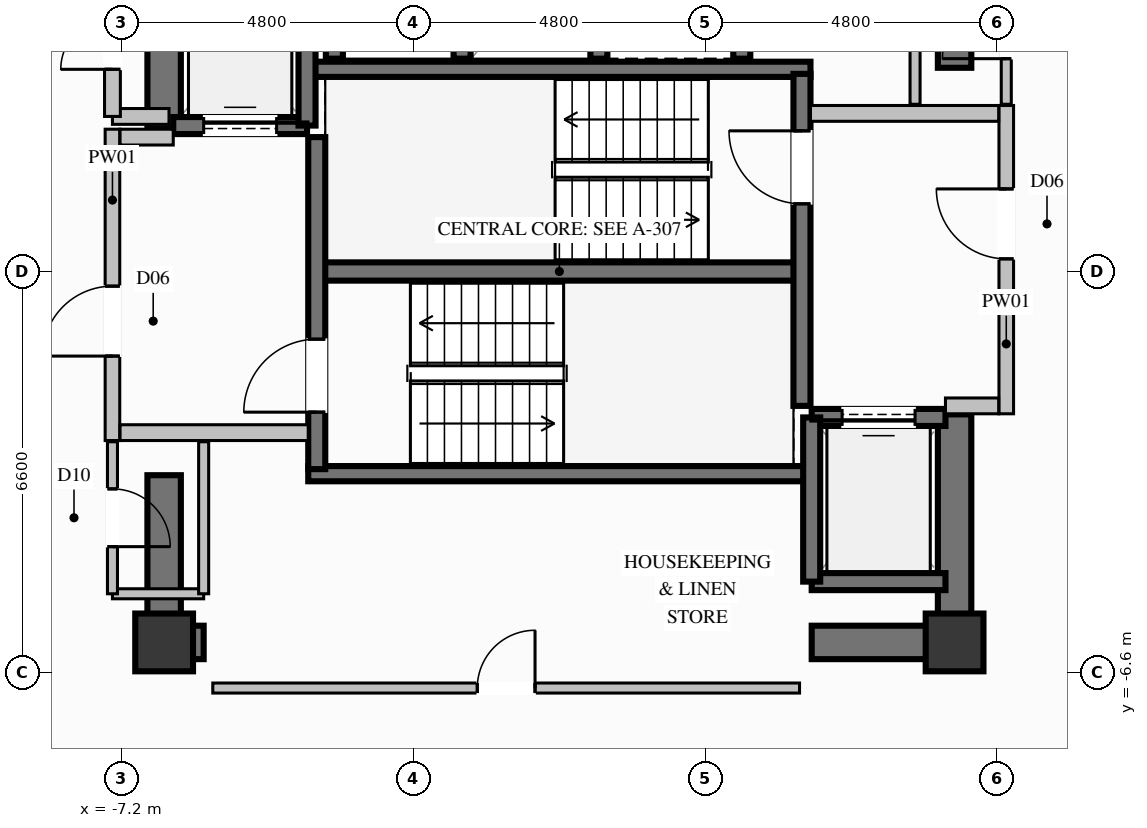
"""IFC4 building model, lengths in metres.
Left out: names, types, materials, properties, quantities, classifications, styles, units other than length and angle.
Written with IfcOpenShell. Run it as: python <this file> out.ifc"""

import sys

from ifc_helpers import new_model, si_unit, direction, frame, frame_2d, origin, origin_2d, place, context, subcontext, project, spatial, rectangle, extrude, element, fill, save


model = new_model("IFC4")
c1 = context("Model", 3, precision=1e-05, world=origin(), true_north=direction((0.0, 1.0)))
c2 = subcontext(c1, "Body", "Model", "MODEL_VIEW")
j1 = project(units=[si_unit("LENGTHUNIT", "METRE"), si_unit("PLANEANGLEUNIT", "RADIAN")], contexts=[c1])
p1 = place(None, origin())
s1 = spatial("IfcSite", under=j1, at=p1, CompositionType="ELEMENT")
p2 = place(p1, origin())
s2 = spatial("IfcBuilding", under=s1, at=p2, CompositionType="ELEMENT")
p3 = place(p2, frame((0.0, 0.0, 223.6)))
s3 = spatial("IfcBuildingStorey", under=s2, at=p3, CompositionType="ELEMENT", Elevation=223.6)
for number, where, z_axis, x_axis in (
    (1, (-6.5, -6.1, 0.0), (0.0, 0.0, 1.0), (1.0, 0.0, 0.0)),
    (2, (6.5, -6.1, 0.0), (0.0, 0.0, 1.0), (1.0, 0.0, 0.0)),
):
    element("IfcColumn", number, at=place(p3, frame(where, z_axis=z_axis, x_axis=x_axis)), inside=s3, PredefinedType="COLUMN", context=c2, shape_type="SweptSolid", body=[
        extrude(rectangle(XDim=0.95, YDim=0.95, at=origin_2d()), origin(), (0.0, 0.0, 1.0), 3.6),
    ])
p4 = place(p3, frame((-3.99, 0.0, 0.0), z_axis=(0.0, 0.0, 1.0), x_axis=(1.0, 0.0, 0.0)))
e3 = element("IfcWall", 3, at=p4, inside=s3, PredefinedType="SHEAR", context=c2, shape_type="SweptSolid", body=[
    extrude(rectangle(XDim=7.98, YDim=0.3, at=frame_2d((3.99, 0.0))), origin(), (0.0, 0.0, 1.0), 3.6),
])
for number, where, z_axis, x_axis in (
    (4, (-4.13, -3.325, 0.0), (0.0, 0.0, 1.0), (1.0, 0.0, 0.0)),
    (5, (-4.13, 3.325, 0.0), (0.0, 0.0, 1.0), (1.0, 0.0, 0.0)),
):
    element("IfcWall", number, at=place(p3, frame(where, z_axis=z_axis, x_axis=x_axis)), inside=s3, PredefinedType="SOLIDWALL", context=c2, shape_type="SweptSolid", body=[
        extrude(rectangle(XDim=8.26, YDim=0.25, at=frame_2d((4.13, 0.0))), origin(), (0.0, 0.0, 1.0), 3.6),
    ])
p5 = place(p3, frame((-6.225, -6.1, 0.0), z_axis=(0.0, 0.0, 1.0), x_axis=(1.0, 0.0, 0.0)))
e6 = element("IfcWall", 6, at=p5, inside=s3, PredefinedType="SHEAR", context=c2, shape_type="SweptSolid", body=[
    extrude(rectangle(XDim=0.375, YDim=0.55, at=frame_2d((0.188, 0.0))), origin(), (0.0, 0.0, 1.0), 3.6),
])
p6 = place(p3, frame((4.15, -6.1, 0.0), z_axis=(0.0, 0.0, 1.0), x_axis=(1.0, 0.0, 0.0)))
e7 = element("IfcWall", 7, at=p6, inside=s3, PredefinedType="SHEAR", context=c2, shape_type="SweptSolid", body=[
    extrude(rectangle(XDim=2.075, YDim=0.55, at=frame_2d((1.038, 0.0))), origin(), (0.0, 0.0, 1.0), 3.6),
])
p7 = place(p3, frame((-6.5, 2.35, 0.0), z_axis=(0.0, 0.0, 1.0), x_axis=(0.0, 1.0, 0.0)))
e8 = element("IfcWall", 8, at=p7, inside=s3, PredefinedType="SHEAR", context=c2, shape_type="SweptSolid", body=[
    extrude(rectangle(XDim=4.025, YDim=0.55, at=frame_2d((2.012, 0.0))), origin(), (0.0, 0.0, 1.0), 3.6),
])
p8 = place(p3, frame((-6.5, -6.375, 0.0), z_axis=(0.0, 0.0, 1.0), x_axis=(0.0, 1.0, 0.0)))
e9 = element("IfcWall", 9, at=p8, inside=s3, PredefinedType="SHEAR", context=c2, shape_type="SweptSolid", body=[
    extrude(rectangle(XDim=3.025, YDim=0.55, at=frame_2d((1.512, 0.0))), origin(), (0.0, 0.0, 1.0), 3.6),
])
p9 = place(p3, frame((6.5, -6.375, 0.0), z_axis=(0.0, 0.0, 1.0), x_axis=(0.0, 1.0, 0.0)))
e10 = element("IfcWall", 10, at=p9, inside=s3, PredefinedType="SHEAR", context=c2, shape_type="SweptSolid", body=[
    extrude(rectangle(XDim=4.025, YDim=0.55, at=frame_2d((2.012, 0.0))), origin(), (0.0, 0.0, 1.0), 3.6),
])
p10 = place(p3, frame((6.5, 3.35, 0.0), z_axis=(0.0, 0.0, 1.0), x_axis=(0.0, 1.0, 0.0)))
e11 = element("IfcWall", 11, at=p10, inside=s3, PredefinedType="SHEAR", context=c2, shape_type="SweptSolid", body=[
    extrude(rectangle(XDim=3.025, YDim=0.55, at=frame_2d((1.512, 0.0))), origin(), (0.0, 0.0, 1.0), 3.6),
])
for number, where, z_axis, x_axis in (
    (12, (-3.7, 6.0, 0.0), (0.0, 0.0, 1.0), (0.0, -1.0, 0.0)),
    (13, (-1.6, 3.5, 0.0), (0.0, 0.0, 1.0), (0.0, 1.0, 0.0)),
    (14, (0.65, 3.5, 0.0), (0.0, 0.0, 1.0), (0.0, 1.0, 0.0)),
    (15, (3.0, 3.5, 0.0), (0.0, 0.0, 1.0), (0.0, 1.0, 0.0)),
):
    element("IfcWall", number, at=place(p3, frame(where, z_axis=z_axis, x_axis=x_axis)), inside=s3, PredefinedType="SOLIDWALL", context=c2, shape_type="SweptSolid", body=[
        extrude(rectangle(XDim=2.5, YDim=0.28, at=frame_2d((1.25, 0.0))), origin(), (0.0, 0.0, 1.0), 3.36),
    ])
p11 = place(p3, frame((-6.35, 2.4, 0.0), z_axis=(0.0, 0.0, 1.0), x_axis=(1.0, 0.0, 0.0)))
e16 = element("IfcWall", 16, at=p11, inside=s3, PredefinedType="SOLIDWALL", context=c2, shape_type="SweptSolid", body=[
    extrude(rectangle(XDim=2.2, YDim=0.28, at=frame_2d((1.1, 0.0))), origin(), (0.0, 0.0, 1.0), 3.36),
])
p12 = place(p11, frame((0.5, 0.0, 0.0)))
e17 = element("IfcOpeningElement", 17, at=p12, cuts=e16, PredefinedType="OPENING", context=c2, shape_type="SweptSolid", body=[
    extrude(rectangle(XDim=1.2, YDim=2.2, at=frame_2d((0.6, 1.1))), frame((0.0, 0.15, 0.0), z_axis=(0.0, -1.0, 0.0), x_axis=(1.0, 0.0, 0.0)), (0.0, 0.0, 1.0), 0.3),
])
p13 = place(p3, frame((-4.15, 2.4, 0.0), z_axis=(0.0, 0.0, 1.0), x_axis=(0.0, 1.0, 0.0)))
e18 = element("IfcWall", 18, at=p13, inside=s3, PredefinedType="SOLIDWALL", context=c2, shape_type="SweptSolid", body=[
    extrude(rectangle(XDim=2.7, YDim=0.28, at=frame_2d((1.35, 0.0))), origin(), (0.0, 0.0, 1.0), 3.36),
])
p14 = place(p3, frame((4.15, -5.1, 0.0), z_axis=(0.0, 0.0, 1.0), x_axis=(1.0, 0.0, 0.0)))
e19 = element("IfcWall", 19, at=p14, inside=s3, PredefinedType="SOLIDWALL", context=c2, shape_type="SweptSolid", body=[
    extrude(rectangle(XDim=2.2, YDim=0.28, at=frame_2d((1.1, 0.0))), origin(), (0.0, 0.0, 1.0), 3.36),
])
p15 = place(p3, frame((6.35, -2.4, 0.0), z_axis=(0.0, 0.0, 1.0), x_axis=(-1.0, 0.0, 0.0)))
e20 = element("IfcWall", 20, at=p15, inside=s3, PredefinedType="SOLIDWALL", context=c2, shape_type="SweptSolid", body=[
    extrude(rectangle(XDim=2.2, YDim=0.28, at=frame_2d((1.1, 0.0))), origin(), (0.0, 0.0, 1.0), 3.36),
])
p16 = place(p15, frame((0.5, 0.0, 0.0)))
e21 = element("IfcOpeningElement", 21, at=p16, cuts=e20, PredefinedType="OPENING", context=c2, shape_type="SweptSolid", body=[
    extrude(rectangle(XDim=1.2, YDim=2.2, at=frame_2d((0.6, 1.1))), frame((0.0, 0.15, 0.0), z_axis=(0.0, -1.0, 0.0), x_axis=(1.0, 0.0, 0.0)), (0.0, 0.0, 1.0), 0.3),
])
p17 = place(p3, frame((4.15, -2.4, 0.0), z_axis=(0.0, 0.0, 1.0), x_axis=(0.0, -1.0, 0.0)))
e22 = element("IfcWall", 22, at=p17, inside=s3, PredefinedType="SOLIDWALL", context=c2, shape_type="SweptSolid", body=[
    extrude(rectangle(XDim=2.7, YDim=0.28, at=frame_2d((1.35, 0.0))), origin(), (0.0, 0.0, 1.0), 3.36),
])
p18 = place(p3, frame((-3.99, -3.25, 0.0), z_axis=(0.0, 0.0, 1.0), x_axis=(0.0, 1.0, 0.0)))
e23 = element("IfcWall", 23, at=p18, inside=s3, PredefinedType="SOLIDWALL", context=c2, shape_type="SweptSolid", body=[
    extrude(rectangle(XDim=5.46, YDim=0.28, at=frame_2d((2.73, 0.0))), origin(), (0.0, 0.0, 1.0), 3.36),
])
p19 = place(p18, frame((0.937, 0.0, 0.0)))
e24 = element("IfcOpeningElement", 24, at=p19, cuts=e23, PredefinedType="OPENING", context=c2, shape_type="SweptSolid", body=[
    extrude(rectangle(XDim=1.2, YDim=2.2, at=frame_2d((0.6, 1.1))), frame((0.0, 0.15, 0.0), z_axis=(0.0, -1.0, 0.0), x_axis=(1.0, 0.0, 0.0)), (0.0, 0.0, 1.0), 0.3),
])
p20 = place(p3, frame((3.99, -2.21, 0.0), z_axis=(0.0, 0.0, 1.0), x_axis=(0.0, 1.0, 0.0)))
e25 = element("IfcWall", 25, at=p20, inside=s3, PredefinedType="SOLIDWALL", context=c2, shape_type="SweptSolid", body=[
    extrude(rectangle(XDim=5.46, YDim=0.28, at=frame_2d((2.73, 0.0))), origin(), (0.0, 0.0, 1.0), 3.36),
])
p21 = place(p20, frame((3.323, 0.0, 0.0)))
e26 = element("IfcOpeningElement", 26, at=p21, cuts=e25, PredefinedType="OPENING", context=c2, shape_type="SweptSolid", body=[
    extrude(rectangle(XDim=1.2, YDim=2.2, at=frame_2d((0.6, 1.1))), frame((0.0, 0.15, 0.0), z_axis=(0.0, -1.0, 0.0), x_axis=(1.0, 0.0, 0.0)), (0.0, 0.0, 1.0), 0.3),
])
p22 = place(p3, frame((-7.35, -2.78, 0.0), z_axis=(0.0, 0.0, 1.0), x_axis=(0.0, 1.0, 0.0)))
e27 = element("IfcWall", 27, at=p22, inside=s3, PredefinedType="PARTITIONING", context=c2, shape_type="SweptSolid", body=[
    extrude(rectangle(XDim=5.12, YDim=0.24, at=frame_2d((2.56, 0.0))), origin(), (0.0, 0.0, 1.0), 2.445),
])
p23 = place(p22, frame((1.389, 0.0, 0.0)))
e28 = element("IfcOpeningElement", 28, at=p23, cuts=e27, PredefinedType="OPENING", context=c2, shape_type="SweptSolid", body=[
    extrude(rectangle(XDim=1.15, YDim=2.2, at=frame_2d((0.575, 1.1))), frame((0.0, 0.13, 0.0), z_axis=(0.0, -1.0, 0.0), x_axis=(1.0, 0.0, 0.0)), (0.0, 0.0, 1.0), 0.26),
])
p24 = place(p3, frame((-7.225, -2.65, 0.0), z_axis=(0.0, 0.0, 1.0), x_axis=(1.0, 0.0, 0.0)))
e29 = element("IfcWall", 29, at=p24, inside=s3, PredefinedType="PARTITIONING", context=c2, shape_type="SweptSolid", body=[
    extrude(rectangle(XDim=3.095, YDim=0.26, at=frame_2d((1.548, 0.0))), origin(), (0.0, 0.0, 1.0), 3.36),
])
p25 = place(p3, frame((-7.225, 2.21, 0.0), z_axis=(0.0, 0.0, 1.0), x_axis=(1.0, 0.0, 0.0)))
e30 = element("IfcWall", 30, at=p25, inside=s3, PredefinedType="PARTITIONING", context=c2, shape_type="SweptSolid", body=[
    extrude(rectangle(XDim=0.875, YDim=0.26, at=frame_2d((0.438, 0.0))), origin(), (0.0, 0.0, 1.0), 3.36),
])
p26 = place(p3, frame((7.35, -2.34, 0.0), z_axis=(0.0, 0.0, 1.0), x_axis=(0.0, 1.0, 0.0)))
e31 = element("IfcWall", 31, at=p26, inside=s3, PredefinedType="PARTITIONING", context=c2, shape_type="SweptSolid", body=[
    extrude(rectangle(XDim=5.07, YDim=0.24, at=frame_2d((2.535, 0.0))), origin(), (0.0, 0.0, 1.0), 2.445),
])
p27 = place(p26, frame((2.548, 0.0, 0.0)))
e32 = element("IfcOpeningElement", 32, at=p27, cuts=e31, PredefinedType="OPENING", context=c2, shape_type="SweptSolid", body=[
    extrude(rectangle(XDim=1.15, YDim=2.2, at=frame_2d((0.575, 1.1))), frame((0.0, 0.13, 0.0), z_axis=(0.0, -1.0, 0.0), x_axis=(1.0, 0.0, 0.0)), (0.0, 0.0, 1.0), 0.26),
])
p28 = place(p3, frame((6.35, -2.21, 0.0), z_axis=(0.0, 0.0, 1.0), x_axis=(1.0, 0.0, 0.0)))
e33 = element("IfcWall", 33, at=p28, inside=s3, PredefinedType="PARTITIONING", context=c2, shape_type="SweptSolid", body=[
    extrude(rectangle(XDim=0.875, YDim=0.26, at=frame_2d((0.438, 0.0))), origin(), (0.0, 0.0, 1.0), 3.36),
])
p29 = place(p3, frame((4.13, 2.6, 0.0), z_axis=(0.0, 0.0, 1.0), x_axis=(1.0, 0.0, 0.0)))
e34 = element("IfcWall", 34, at=p29, inside=s3, PredefinedType="PARTITIONING", context=c2, shape_type="SweptSolid", body=[
    extrude(rectangle(XDim=3.095, YDim=0.26, at=frame_2d((1.548, 0.0))), origin(), (0.0, 0.0, 1.0), 3.36),
])
p30 = place(p3, frame((-7.35, 2.55, 0.0), z_axis=(0.0, 0.0, 1.0), x_axis=(1.0, 0.0, 0.0)))
e35 = element("IfcWall", 35, at=p30, inside=s3, PredefinedType="PARTITIONING", context=c2, shape_type="SweptSolid", body=[
    extrude(rectangle(XDim=0.93, YDim=0.26, at=frame_2d((0.465, 0.0))), origin(), (0.0, 0.0, 1.0), 3.36),
])
p31 = place(p3, frame((-7.35, 2.55, 0.0), z_axis=(0.0, 0.0, 1.0), x_axis=(0.0, 1.0, 0.0)))
e36 = element("IfcWall", 36, at=p31, inside=s3, PredefinedType="PARTITIONING", context=c2, shape_type="SweptSolid", body=[
    extrude(rectangle(XDim=2.4, YDim=0.26, at=frame_2d((1.2, 0.0))), origin(), (0.0, 0.0, 1.0), 2.445),
])
p32 = place(p31, frame((0.775, 0.0, 0.0)))
e37 = element("IfcOpeningElement", 37, at=p32, cuts=e36, PredefinedType="OPENING", context=c2, shape_type="SweptSolid", body=[
    extrude(rectangle(XDim=0.85, YDim=2.05, at=frame_2d((0.425, 1.025))), frame((0.0, 0.14, 0.0), z_axis=(0.0, -1.0, 0.0), x_axis=(1.0, 0.0, 0.0)), (0.0, 0.0, 1.0), 0.28),
])
p33 = place(p3, frame((-7.35, -5.3, 0.0), z_axis=(0.0, 0.0, 1.0), x_axis=(1.0, 0.0, 0.0)))
e38 = element("IfcWall", 38, at=p33, inside=s3, PredefinedType="PARTITIONING", context=c2, shape_type="SweptSolid", body=[
    extrude(rectangle(XDim=1.5, YDim=0.165, at=frame_2d((0.75, 0.0))), origin(), (0.0, 0.0, 1.0), 2.445),
])
p34 = place(p3, frame((-5.85, -5.3, 0.0), z_axis=(0.0, 0.0, 1.0), x_axis=(0.0, 1.0, 0.0)))
e39 = element("IfcWall", 39, at=p34, inside=s3, PredefinedType="PARTITIONING", context=c2, shape_type="SweptSolid", body=[
    extrude(rectangle(XDim=2.5, YDim=0.165, at=frame_2d((1.25, 0.0))), origin(), (0.0, 0.0, 1.0), 2.445),
])
p35 = place(p3, frame((-7.35, -2.8, 0.0), z_axis=(0.0, 0.0, 1.0), x_axis=(0.0, -1.0, 0.0)))
e40 = element("IfcWall", 40, at=p35, inside=s3, PredefinedType="PARTITIONING", context=c2, shape_type="SweptSolid", body=[
    extrude(rectangle(XDim=2.5, YDim=0.165, at=frame_2d((1.25, 0.0))), origin(), (0.0, 0.0, 1.0), 3.36),
])
p36 = place(p35, frame((0.775, 0.0, 0.0)))
e41 = element("IfcOpeningElement", 41, at=p36, cuts=e40, PredefinedType="OPENING", context=c2, shape_type="SweptSolid", body=[
    extrude(rectangle(XDim=0.95, YDim=2.1, at=frame_2d((0.475, 1.05))), frame((0.0, 0.093, 0.0), z_axis=(0.0, -1.0, 0.0), x_axis=(1.0, 0.0, 0.0)), (0.0, 0.0, 1.0), 0.185),
])
p37 = place(p3, frame((7.35, 2.75, 0.0), z_axis=(0.0, 0.0, 1.0), x_axis=(0.0, 1.0, 0.0)))
e42 = element("IfcWall", 42, at=p37, inside=s3, PredefinedType="PARTITIONING", context=c2, shape_type="SweptSolid", body=[
    extrude(rectangle(XDim=2.55, YDim=0.165, at=frame_2d((1.275, 0.0))), origin(), (0.0, 0.0, 1.0), 3.36),
])
p38 = place(p37, frame((0.75, 0.0, 0.0)))
e43 = element("IfcOpeningElement", 43, at=p38, cuts=e42, PredefinedType="OPENING", context=c2, shape_type="SweptSolid", body=[
    extrude(rectangle(XDim=1.05, YDim=2.15, at=frame_2d((0.525, 1.075))), frame((0.0, 0.093, 0.0), z_axis=(0.0, -1.0, 0.0), x_axis=(1.0, 0.0, 0.0)), (0.0, 0.0, 1.0), 0.185),
])
p39 = place(p3, frame((5.85, 5.3, 0.0), z_axis=(0.0, 0.0, 1.0), x_axis=(0.0, -1.0, 0.0)))
e44 = element("IfcWall", 44, at=p39, inside=s3, PredefinedType="PARTITIONING", context=c2, shape_type="SweptSolid", body=[
    extrude(rectangle(XDim=2.55, YDim=0.165, at=frame_2d((1.275, 0.0))), origin(), (0.0, 0.0, 1.0), 2.445),
])
p40 = place(p3, frame((-5.7, -6.85, 0.0), z_axis=(0.0, 0.0, 1.0), x_axis=(1.0, 0.0, 0.0)))
e45 = element("IfcWall", 45, at=p40, inside=s3, PredefinedType="PARTITIONING", context=c2, shape_type="SweptSolid", body=[
    extrude(rectangle(XDim=9.65, YDim=0.165, at=frame_2d((4.825, 0.0))), origin(), (0.0, 0.0, 1.0), 2.445),
])
p41 = place(p40, frame((4.35, 0.0, 0.0)))
e46 = element("IfcOpeningElement", 46, at=p41, cuts=e45, PredefinedType="OPENING", context=c2, shape_type="SweptSolid", body=[
    extrude(rectangle(XDim=0.95, YDim=2.1, at=frame_2d((0.475, 1.05))), frame((0.0, 0.093, 0.0), z_axis=(0.0, -1.0, 0.0), x_axis=(1.0, 0.0, 0.0)), (0.0, 0.0, 1.0), 0.185),
])
p42 = place(p12, origin())
e47 = element("IfcDoor", 47, at=p42, inside=s3, OperationType="SLIDING_TO_LEFT", PredefinedType="DOOR", context=c2, shape_type="SweptSolid", body=[
    extrude(rectangle(XDim=1.2, YDim=2.2, at=frame_2d((0.6, 1.1))), frame((0.0, 0.025, 0.0), z_axis=(0.0, -1.0, 0.0), x_axis=(1.0, 0.0, 0.0)), (0.0, 0.0, 1.0), 0.05),
])
fill(e17, e47)
p43 = place(p16, origin())
e48 = element("IfcDoor", 48, at=p43, inside=s3, OperationType="SLIDING_TO_LEFT", PredefinedType="DOOR", context=c2, shape_type="SweptSolid", body=[
    extrude(rectangle(XDim=1.2, YDim=2.2, at=frame_2d((0.6, 1.1))), frame((0.0, 0.025, 0.0), z_axis=(0.0, -1.0, 0.0), x_axis=(1.0, 0.0, 0.0)), (0.0, 0.0, 1.0), 0.05),
])
fill(e21, e48)
p44 = place(p19, origin())
e49 = element("IfcDoor", 49, at=p44, inside=s3, OperationType="SINGLE_SWING_LEFT", PredefinedType="DOOR", context=c2, shape_type="SweptSolid", body=[
    extrude(rectangle(XDim=1.2, YDim=2.2, at=frame_2d((0.6, 1.1))), frame((0.0, 0.025, 0.0), z_axis=(0.0, -1.0, 0.0), x_axis=(1.0, 0.0, 0.0)), (0.0, 0.0, 1.0), 0.05),
])
fill(e24, e49)
p45 = place(p21, origin())
e50 = element("IfcDoor", 50, at=p45, inside=s3, OperationType="SINGLE_SWING_RIGHT", PredefinedType="DOOR", context=c2, shape_type="SweptSolid", body=[
    extrude(rectangle(XDim=1.2, YDim=2.2, at=frame_2d((0.6, 1.1))), frame((0.0, 0.025, 0.0), z_axis=(0.0, -1.0, 0.0), x_axis=(1.0, 0.0, 0.0)), (0.0, 0.0, 1.0), 0.05),
])
fill(e26, e50)
p46 = place(p23, origin())
e51 = element("IfcDoor", 51, at=p46, inside=s3, OperationType="SINGLE_SWING_LEFT", PredefinedType="DOOR", context=c2, shape_type="SweptSolid", body=[
    extrude(rectangle(XDim=1.15, YDim=2.2, at=frame_2d((0.575, 1.1))), frame((0.0, 0.025, 0.0), z_axis=(0.0, -1.0, 0.0), x_axis=(1.0, 0.0, 0.0)), (0.0, 0.0, 1.0), 0.05),
])
fill(e28, e51)
p47 = place(p27, origin())
e52 = element("IfcDoor", 52, at=p47, inside=s3, OperationType="SINGLE_SWING_RIGHT", PredefinedType="DOOR", context=c2, shape_type="SweptSolid", body=[
    extrude(rectangle(XDim=1.15, YDim=2.2, at=frame_2d((0.575, 1.1))), frame((0.0, 0.025, 0.0), z_axis=(0.0, -1.0, 0.0), x_axis=(1.0, 0.0, 0.0)), (0.0, 0.0, 1.0), 0.05),
])
fill(e32, e52)
p48 = place(p32, origin())
e53 = element("IfcDoor", 53, at=p48, inside=s3, OperationType="SINGLE_SWING_LEFT", PredefinedType="DOOR", context=c2, shape_type="SweptSolid", body=[
    extrude(rectangle(XDim=0.85, YDim=2.05, at=frame_2d((0.425, 1.025))), frame((0.0, 0.025, 0.0), z_axis=(0.0, -1.0, 0.0), x_axis=(1.0, 0.0, 0.0)), (0.0, 0.0, 1.0), 0.05),
])
fill(e37, e53)
p49 = place(p36, origin())
e54 = element("IfcDoor", 54, at=p49, inside=s3, OperationType="SINGLE_SWING_RIGHT", PredefinedType="DOOR", context=c2, shape_type="SweptSolid", body=[
    extrude(rectangle(XDim=0.95, YDim=2.1, at=frame_2d((0.475, 1.05))), frame((0.0, 0.025, 0.0), z_axis=(0.0, -1.0, 0.0), x_axis=(1.0, 0.0, 0.0)), (0.0, 0.0, 1.0), 0.05),
])
fill(e41, e54)
p50 = place(p38, origin())
e55 = element("IfcDoor", 55, at=p50, inside=s3, OperationType="SINGLE_SWING_LEFT", PredefinedType="DOOR", context=c2, shape_type="SweptSolid", body=[
    extrude(rectangle(XDim=1.05, YDim=2.15, at=frame_2d((0.525, 1.075))), frame((0.0, 0.025, 0.0), z_axis=(0.0, -1.0, 0.0), x_axis=(1.0, 0.0, 0.0)), (0.0, 0.0, 1.0), 0.05),
])
fill(e43, e55)
p51 = place(p41, origin())
e56 = element("IfcDoor", 56, at=p51, inside=s3, OperationType="SINGLE_SWING_RIGHT", PredefinedType="DOOR", context=c2, shape_type="SweptSolid", body=[
    extrude(rectangle(XDim=0.95, YDim=2.1, at=frame_2d((0.475, 1.05))), frame((0.0, 0.025, 0.0), z_axis=(0.0, -1.0, 0.0), x_axis=(1.0, 0.0, 0.0)), (0.0, 0.0, 1.0), 0.05),
])
fill(e46, e56)
save(model, sys.argv[1])
